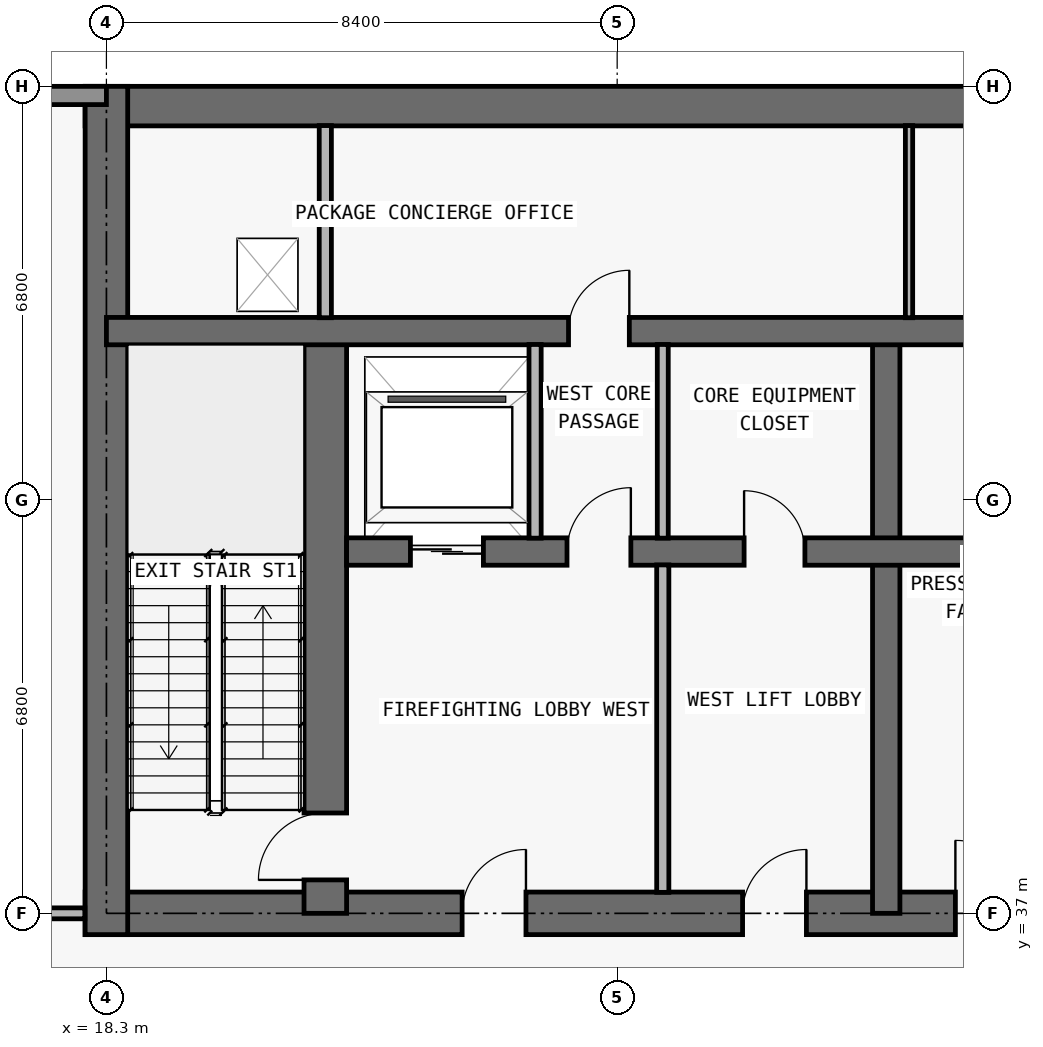
"""IFC4 building model, lengths in metres.
Left out: names, types, materials, properties, quantities, classifications, styles, units other than length and angle.
Written with IfcOpenShell. Run it as: python <this file> out.ifc"""

import sys

from ifc_helpers import new_model, si_unit, direction, frame, frame_2d, origin, place, context, subcontext, project, spatial, rectangle, extrude, element, fill, save


model = new_model("IFC4")
c1 = context("Model", 3, precision=1e-05, world=origin(), true_north=direction((0.0, 1.0)))
c2 = subcontext(c1, "Body", "Model", "MODEL_VIEW")
j1 = project(units=[si_unit("LENGTHUNIT", "METRE"), si_unit("PLANEANGLEUNIT", "RADIAN")], contexts=[c1])
p1 = place(None, origin())
s1 = spatial("IfcSite", under=j1, at=p1, CompositionType="ELEMENT")
p2 = place(p1, origin())
s2 = spatial("IfcBuilding", under=s1, at=p2, CompositionType="ELEMENT")
p3 = place(p2, frame((0.0, 0.0, 290.2)))
s3 = spatial("IfcBuildingStorey", under=s2, at=p3, CompositionType="ELEMENT", Elevation=290.2)
p4 = place(p3, frame((17.95, 37.0, 0.0), z_axis=(0.0, 0.0, 1.0), x_axis=(1.0, 0.0, 0.0)))
e1 = element("IfcWall", 1, at=p4, inside=s3, PredefinedType="SHEAR", context=c2, shape_type="SweptSolid", body=[
    extrude(rectangle(XDim=41.9, YDim=0.7, at=frame_2d((20.95, 0.0))), origin(), (0.0, 0.0, 1.0), 5.1),
])
p5 = place(p4, frame((14.312, 0.0, 0.0)))
e2 = element("IfcOpeningElement", 2, at=p5, cuts=e1, PredefinedType="OPENING", context=c2, shape_type="SweptSolid", body=[
    extrude(rectangle(XDim=1.2, YDim=2.2, at=frame_2d((0.6, 1.1))), frame((0.0, 0.36, 0.0), z_axis=(0.0, -1.0, 0.0), x_axis=(1.0, 0.0, 0.0)), (0.0, 0.0, 1.0), 0.72),
])
p6 = place(p4, frame((6.2, 0.0, 0.0)))
e3 = element("IfcOpeningElement", 3, at=p6, cuts=e1, PredefinedType="OPENING", context=c2, shape_type="SweptSolid", body=[
    extrude(rectangle(XDim=1.05, YDim=2.15, at=frame_2d((0.525, 1.075))), frame((0.0, 0.36, 0.0), z_axis=(0.0, -1.0, 0.0), x_axis=(1.0, 0.0, 0.0)), (0.0, 0.0, 1.0), 0.72),
])
p7 = place(p4, frame((34.7, 0.0, 0.0)))
e4 = element("IfcOpeningElement", 4, at=p7, cuts=e1, PredefinedType="OPENING", context=c2, shape_type="SweptSolid", body=[
    extrude(rectangle(XDim=1.05, YDim=2.15, at=frame_2d((0.525, 1.075))), frame((0.0, 0.36, 0.0), z_axis=(0.0, -1.0, 0.0), x_axis=(1.0, 0.0, 0.0)), (0.0, 0.0, 1.0), 0.72),
])
p8 = place(p4, frame((10.812, 0.0, 0.0)))
e5 = element("IfcOpeningElement", 5, at=p8, cuts=e1, PredefinedType="OPENING", context=c2, shape_type="SweptSolid", body=[
    extrude(rectangle(XDim=1.05, YDim=2.15, at=frame_2d((0.525, 1.075))), frame((0.0, 0.36, 0.0), z_axis=(0.0, -1.0, 0.0), x_axis=(1.0, 0.0, 0.0)), (0.0, 0.0, 1.0), 0.72),
])
p9 = place(p4, frame((24.05, 0.0, 0.0)))
e6 = element("IfcOpeningElement", 6, at=p9, cuts=e1, PredefinedType="OPENING", context=c2, shape_type="SweptSolid", body=[
    extrude(rectangle(XDim=1.05, YDim=2.15, at=frame_2d((0.525, 1.075))), frame((0.0, 0.36, 0.0), z_axis=(0.0, -1.0, 0.0), x_axis=(1.0, 0.0, 0.0)), (0.0, 0.0, 1.0), 0.72),
])
p10 = place(p3, frame((17.95, 50.275, 0.0), z_axis=(0.0, 0.0, 1.0), x_axis=(1.0, 0.0, 0.0)))
e7 = element("IfcWall", 7, at=p10, inside=s3, PredefinedType="SHEAR", context=c2, shape_type="SweptSolid", body=[
    extrude(rectangle(XDim=41.9, YDim=0.65, at=frame_2d((20.95, 0.0))), origin(), (0.0, 0.0, 1.0), 5.1),
])
p11 = place(p3, frame((18.3, 36.65, 0.0), z_axis=(0.0, 0.0, 1.0), x_axis=(0.0, 1.0, 0.0)))
e8 = element("IfcWall", 8, at=p11, inside=s3, PredefinedType="SHEAR", context=c2, shape_type="SweptSolid", body=[
    extrude(rectangle(XDim=13.95, YDim=0.7, at=frame_2d((6.975, 0.0))), origin(), (0.0, 0.0, 1.0), 5.1),
])
p12 = place(p3, frame((21.9, 37.0, 0.0), z_axis=(0.0, 0.0, 1.0), x_axis=(0.0, 1.0, 0.0)))
e9 = element("IfcWall", 9, at=p12, inside=s3, PredefinedType="SHEAR", context=c2, shape_type="SweptSolid", body=[
    extrude(rectangle(XDim=9.575, YDim=0.7, at=frame_2d((4.788, 0.0))), origin(), (0.0, 0.0, 1.0), 5.1),
])
p13 = place(p12, frame((0.55, 0.0, 0.0)))
e10 = element("IfcOpeningElement", 10, at=p13, cuts=e9, PredefinedType="OPENING", context=c2, shape_type="SweptSolid", body=[
    extrude(rectangle(XDim=1.1, YDim=2.15, at=frame_2d((0.55, 1.075))), frame((0.0, 0.36, 0.0), z_axis=(0.0, -1.0, 0.0), x_axis=(1.0, 0.0, 0.0)), (0.0, 0.0, 1.0), 0.72),
])
p14 = place(p3, frame((31.125, 37.0, 0.0), z_axis=(0.0, 0.0, 1.0), x_axis=(0.0, 1.0, 0.0)))
e11 = element("IfcWall", 11, at=p14, inside=s3, PredefinedType="SHEAR", context=c2, shape_type="SweptSolid", body=[
    extrude(rectangle(XDim=9.575, YDim=0.45, at=frame_2d((4.788, 0.0))), origin(), (0.0, 0.0, 1.0), 5.1),
])
p15 = place(p3, frame((22.25, 42.95, 0.0), z_axis=(0.0, 0.0, 1.0), x_axis=(1.0, 0.0, 0.0)))
e12 = element("IfcWall", 12, at=p15, inside=s3, PredefinedType="SHEAR", context=c2, shape_type="SweptSolid", body=[
    extrude(rectangle(XDim=33.3, YDim=0.45, at=frame_2d((16.65, 0.0))), origin(), (0.0, 0.0, 1.0), 5.1),
])
p16 = place(p15, frame((1.05, 0.0, 0.0)))
e13 = element("IfcOpeningElement", 13, at=p16, cuts=e12, PredefinedType="OPENING", context=c2, shape_type="SweptSolid", body=[
    extrude(rectangle(XDim=1.2, YDim=2.2, at=frame_2d((0.6, 1.1))), frame((0.0, 0.235, 0.0), z_axis=(0.0, -1.0, 0.0), x_axis=(1.0, 0.0, 0.0)), (0.0, 0.0, 1.0), 0.47),
])
p17 = place(p15, frame((31.05, 0.0, 0.0)))
e14 = element("IfcOpeningElement", 14, at=p17, cuts=e12, PredefinedType="OPENING", context=c2, shape_type="SweptSolid", body=[
    extrude(rectangle(XDim=1.2, YDim=2.2, at=frame_2d((0.6, 1.1))), frame((0.0, 0.235, 0.0), z_axis=(0.0, -1.0, 0.0), x_axis=(1.0, 0.0, 0.0)), (0.0, 0.0, 1.0), 0.47),
])
p18 = place(p15, frame((3.625, 0.0, 0.0)))
e15 = element("IfcOpeningElement", 15, at=p18, cuts=e12, PredefinedType="OPENING", context=c2, shape_type="SweptSolid", body=[
    extrude(rectangle(XDim=1.05, YDim=2.15, at=frame_2d((0.525, 1.075))), frame((0.0, 0.235, 0.0), z_axis=(0.0, -1.0, 0.0), x_axis=(1.0, 0.0, 0.0)), (0.0, 0.0, 1.0), 0.47),
])
p19 = place(p15, frame((28.675, 0.0, 0.0)))
e16 = element("IfcOpeningElement", 16, at=p19, cuts=e12, PredefinedType="OPENING", context=c2, shape_type="SweptSolid", body=[
    extrude(rectangle(XDim=1.05, YDim=2.15, at=frame_2d((0.525, 1.075))), frame((0.0, 0.235, 0.0), z_axis=(0.0, -1.0, 0.0), x_axis=(1.0, 0.0, 0.0)), (0.0, 0.0, 1.0), 0.47),
])
p20 = place(p15, frame((6.538, 0.0, 0.0)))
e17 = element("IfcOpeningElement", 17, at=p20, cuts=e12, PredefinedType="OPENING", context=c2, shape_type="SweptSolid", body=[
    extrude(rectangle(XDim=1.0, YDim=2.2, at=frame_2d((0.5, 1.1))), frame((0.0, 0.235, 0.0), z_axis=(0.0, -1.0, 0.0), x_axis=(1.0, 0.0, 0.0)), (0.0, 0.0, 1.0), 0.47),
])
p21 = place(p15, frame((19.675, 0.0, 0.0)))
e18 = element("IfcOpeningElement", 18, at=p21, cuts=e12, PredefinedType="OPENING", context=c2, shape_type="SweptSolid", body=[
    extrude(rectangle(XDim=1.2, YDim=2.2, at=frame_2d((0.6, 1.1))), frame((0.0, 0.235, 0.0), z_axis=(0.0, -1.0, 0.0), x_axis=(1.0, 0.0, 0.0)), (0.0, 0.0, 1.0), 0.47),
])
p22 = place(p3, frame((18.3, 46.575, 0.0), z_axis=(0.0, 0.0, 1.0), x_axis=(1.0, 0.0, 0.0)))
e19 = element("IfcWall", 19, at=p22, inside=s3, PredefinedType="SHEAR", context=c2, shape_type="SweptSolid", body=[
    extrude(rectangle(XDim=41.2, YDim=0.45, at=frame_2d((20.6, 0.0))), origin(), (0.0, 0.0, 1.0), 5.1),
])
p23 = place(p22, frame((7.6, 0.0, 0.0)))
e20 = element("IfcOpeningElement", 20, at=p23, cuts=e19, PredefinedType="OPENING", context=c2, shape_type="SweptSolid", body=[
    extrude(rectangle(XDim=1.0, YDim=2.2, at=frame_2d((0.5, 1.1))), frame((0.0, 0.235, 0.0), z_axis=(0.0, -1.0, 0.0), x_axis=(1.0, 0.0, 0.0)), (0.0, 0.0, 1.0), 0.47),
])
p24 = place(p22, frame((32.625, 0.0, 0.0)))
e21 = element("IfcOpeningElement", 21, at=p24, cuts=e19, PredefinedType="OPENING", context=c2, shape_type="SweptSolid", body=[
    extrude(rectangle(XDim=1.05, YDim=2.15, at=frame_2d((0.525, 1.075))), frame((0.0, 0.235, 0.0), z_axis=(0.0, -1.0, 0.0), x_axis=(1.0, 0.0, 0.0)), (0.0, 0.0, 1.0), 0.47),
])
p25 = place(p3, frame((16.5, 50.45, 0.0), z_axis=(0.0, 0.0, 1.0), x_axis=(1.0, 0.0, 0.0)))
e22 = element("IfcWall", 22, at=p25, inside=s3, PredefinedType="STANDARD", context=c2, shape_type="SweptSolid", body=[
    extrude(rectangle(XDim=1.8, YDim=0.3, at=frame_2d((0.9, 0.0))), origin(), (0.0, 0.0, 1.0), 5.1),
])
p26 = place(p3, frame((21.9, 46.795, 0.0), z_axis=(0.0, 0.0, 1.0), x_axis=(0.0, 1.0, 0.0)))
e23 = element("IfcWall", 23, at=p26, inside=s3, PredefinedType="PARTITIONING", context=c2, shape_type="SweptSolid", body=[
    extrude(rectangle(XDim=3.16, YDim=0.2, at=frame_2d((1.58, 0.0))), origin(), (0.0, 0.0, 1.0), 5.1),
])
p27 = place(p3, frame((25.35, 43.17, 0.0), z_axis=(0.0, 0.0, 1.0), x_axis=(0.0, 1.0, 0.0)))
e24 = element("IfcWall", 24, at=p27, inside=s3, PredefinedType="PARTITIONING", context=c2, shape_type="SweptSolid", body=[
    extrude(rectangle(XDim=3.185, YDim=0.2, at=frame_2d((1.593, 0.0))), origin(), (0.0, 0.0, 1.0), 5.1),
])
p28 = place(p3, frame((27.45, 37.345, 0.0), z_axis=(0.0, 0.0, 1.0), x_axis=(0.0, 1.0, 0.0)))
e25 = element("IfcWall", 25, at=p28, inside=s3, PredefinedType="PARTITIONING", context=c2, shape_type="SweptSolid", body=[
    extrude(rectangle(XDim=5.385, YDim=0.2, at=frame_2d((2.692, 0.0))), origin(), (0.0, 0.0, 1.0), 5.1),
])
p29 = place(p3, frame((27.45, 43.17, 0.0), z_axis=(0.0, 0.0, 1.0), x_axis=(0.0, 1.0, 0.0)))
e26 = element("IfcWall", 26, at=p29, inside=s3, PredefinedType="PARTITIONING", context=c2, shape_type="SweptSolid", body=[
    extrude(rectangle(XDim=3.185, YDim=0.18, at=frame_2d((1.593, 0.0))), origin(), (0.0, 0.0, 1.0), 5.1),
])
p30 = place(p3, frame((31.5, 46.795, 0.0), z_axis=(0.0, 0.0, 1.0), x_axis=(0.0, 1.0, 0.0)))
e27 = element("IfcWall", 27, at=p30, inside=s3, PredefinedType="PARTITIONING", context=c2, shape_type="SweptSolid", body=[
    extrude(rectangle(XDim=3.16, YDim=0.12, at=frame_2d((1.58, 0.0))), origin(), (0.0, 0.0, 1.0), 5.1),
])
p31 = place(p3, frame((16.5, 37.0, 0.0), z_axis=(0.0, 0.0, 1.0), x_axis=(1.0, 0.0, 0.0)))
e28 = element("IfcWall", 28, at=p31, inside=s3, PredefinedType="PARTITIONING", context=c2, shape_type="SweptSolid", body=[
    extrude(rectangle(XDim=1.445, YDim=0.18, at=frame_2d((0.723, 0.0))), origin(), (0.0, 0.0, 1.0), 5.1),
])
p32 = place(p16, origin())
e29 = element("IfcDoor", 29, at=p32, inside=s3, OperationType="DOUBLE_DOOR_SLIDING", PredefinedType="DOOR", context=c2, shape_type="SweptSolid", body=[
    extrude(rectangle(XDim=1.2, YDim=2.2, at=frame_2d((0.6, 1.1))), frame((0.0, 0.025, 0.0), z_axis=(0.0, -1.0, 0.0), x_axis=(1.0, 0.0, 0.0)), (0.0, 0.0, 1.0), 0.05),
])
fill(e13, e29)
p33 = place(p5, origin())
e30 = element("IfcDoor", 30, at=p33, inside=s3, OperationType="SINGLE_SWING_LEFT", PredefinedType="DOOR", context=c2, shape_type="SweptSolid", body=[
    extrude(rectangle(XDim=1.2, YDim=2.2, at=frame_2d((0.6, 1.1))), frame((0.0, 0.025, 0.0), z_axis=(0.0, -1.0, 0.0), x_axis=(1.0, 0.0, 0.0)), (0.0, 0.0, 1.0), 0.05),
])
fill(e2, e30)
p34 = place(p6, origin())
e31 = element("IfcDoor", 31, at=p34, inside=s3, OperationType="SINGLE_SWING_RIGHT", PredefinedType="DOOR", context=c2, shape_type="SweptSolid", body=[
    extrude(rectangle(XDim=1.05, YDim=2.15, at=frame_2d((0.525, 1.075))), frame((0.0, 0.025, 0.0), z_axis=(0.0, -1.0, 0.0), x_axis=(1.0, 0.0, 0.0)), (0.0, 0.0, 1.0), 0.05),
])
fill(e3, e31)
p35 = place(p13, origin())
e32 = element("IfcDoor", 32, at=p35, inside=s3, OperationType="SINGLE_SWING_LEFT", PredefinedType="DOOR", context=c2, shape_type="SweptSolid", body=[
    extrude(rectangle(XDim=1.1, YDim=2.15, at=frame_2d((0.55, 1.075))), frame((0.0, 0.025, 0.0), z_axis=(0.0, -1.0, 0.0), x_axis=(1.0, 0.0, 0.0)), (0.0, 0.0, 1.0), 0.05),
])
fill(e10, e32)
p36 = place(p18, origin())
e33 = element("IfcDoor", 33, at=p36, inside=s3, OperationType="SINGLE_SWING_RIGHT", PredefinedType="DOOR", context=c2, shape_type="SweptSolid", body=[
    extrude(rectangle(XDim=1.05, YDim=2.15, at=frame_2d((0.525, 1.075))), frame((0.0, 0.025, 0.0), z_axis=(0.0, -1.0, 0.0), x_axis=(1.0, 0.0, 0.0)), (0.0, 0.0, 1.0), 0.05),
])
fill(e15, e33)
p37 = place(p8, origin())
e34 = element("IfcDoor", 34, at=p37, inside=s3, OperationType="SINGLE_SWING_RIGHT", PredefinedType="DOOR", context=c2, shape_type="SweptSolid", body=[
    extrude(rectangle(XDim=1.05, YDim=2.15, at=frame_2d((0.525, 1.075))), frame((0.0, 0.025, 0.0), z_axis=(0.0, -1.0, 0.0), x_axis=(1.0, 0.0, 0.0)), (0.0, 0.0, 1.0), 0.05),
])
fill(e5, e34)
p38 = place(p20, origin())
e35 = element("IfcDoor", 35, at=p38, inside=s3, OperationType="SINGLE_SWING_LEFT", PredefinedType="DOOR", context=c2, shape_type="SweptSolid", body=[
    extrude(rectangle(XDim=1.0, YDim=2.2, at=frame_2d((0.5, 1.1))), frame((0.0, 0.025, 0.0), z_axis=(0.0, -1.0, 0.0), x_axis=(1.0, 0.0, 0.0)), (0.0, 0.0, 1.0), 0.05),
])
fill(e17, e35)
p39 = place(p23, origin())
e36 = element("IfcDoor", 36, at=p39, inside=s3, OperationType="SINGLE_SWING_RIGHT", PredefinedType="DOOR", context=c2, shape_type="SweptSolid", body=[
    extrude(rectangle(XDim=1.0, YDim=2.2, at=frame_2d((0.5, 1.1))), frame((0.0, 0.025, 0.0), z_axis=(0.0, -1.0, 0.0), x_axis=(1.0, 0.0, 0.0)), (0.0, 0.0, 1.0), 0.05),
])
fill(e20, e36)
save(model, sys.argv[1])
